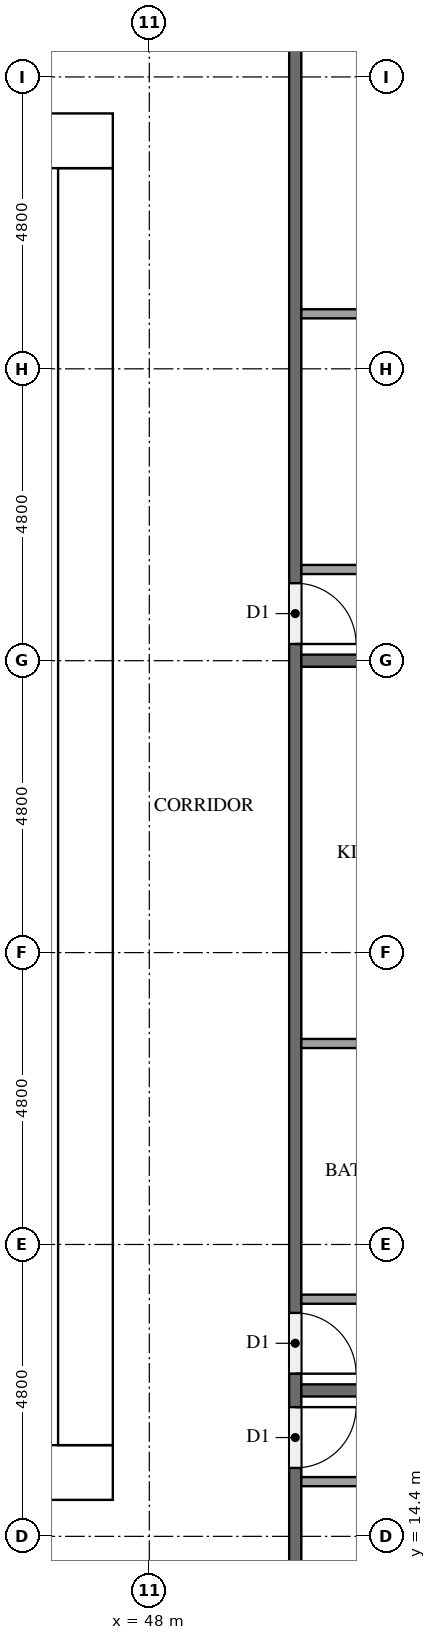
"""IFC4 building model, lengths in metres.
Left out: names, types, materials, properties, quantities, classifications, styles, units other than length and angle.
Written with IfcOpenShell. Run it as: python <this file> out.ifc"""

import sys

from ifc_helpers import new_model, si_unit, direction, frame, frame_2d, origin, place, context, subcontext, project, spatial, rectangle, extrude, element, fill, save


model = new_model("IFC4")
c1 = context("Model", 3, precision=1e-05, world=origin(), true_north=direction((0.0, 1.0)))
c2 = subcontext(c1, "Body", "Model", "MODEL_VIEW")
j1 = project(units=[si_unit("LENGTHUNIT", "METRE"), si_unit("PLANEANGLEUNIT", "RADIAN")], contexts=[c1])
p1 = place(None, origin())
s1 = spatial("IfcSite", under=j1, at=p1, CompositionType="ELEMENT")
p2 = place(p1, origin())
s2 = spatial("IfcBuilding", under=s1, at=p2, CompositionType="ELEMENT")
p3 = place(p2, frame((0.0, 0.0, 66.3)))
s3 = spatial("IfcBuildingStorey", under=s2, at=p3, CompositionType="ELEMENT", Elevation=66.3)
p4 = place(p3, frame((15.0, 15.45, 0.0), z_axis=(0.0, 0.0, 1.0), x_axis=(1.0, 0.0, 0.0)))
e1 = element("IfcWall", 1, at=p4, inside=s3, PredefinedType="SHEAR", context=c2, shape_type="SweptSolid", body=[
    extrude(rectangle(XDim=32.4, YDim=0.9, at=frame_2d((16.2, 0.0))), origin(), (0.0, 0.0, 1.0), 3.2),
])
p5 = place(p4, frame((15.3, 0.0, 0.0)))
e2 = element("IfcOpeningElement", 2, at=p5, cuts=e1, PredefinedType="OPENING", context=c2, shape_type="SweptSolid", body=[
    extrude(rectangle(XDim=1.8, YDim=2.1, at=frame_2d((0.9, 1.05))), frame((0.0, 0.46, 0.0), z_axis=(0.0, -1.0, 0.0), x_axis=(1.0, 0.0, 0.0)), (0.0, 0.0, 1.0), 0.92),
])
p6 = place(p3, frame((15.0, 37.35, 0.0), z_axis=(0.0, 0.0, 1.0), x_axis=(1.0, 0.0, 0.0)))
e3 = element("IfcWall", 3, at=p6, inside=s3, PredefinedType="SHEAR", context=c2, shape_type="SweptSolid", body=[
    extrude(rectangle(XDim=32.4, YDim=0.9, at=frame_2d((16.2, 0.0))), origin(), (0.0, 0.0, 1.0), 3.2),
])
p7 = place(p6, frame((15.3, 0.0, 0.0)))
e4 = element("IfcOpeningElement", 4, at=p7, cuts=e3, PredefinedType="OPENING", context=c2, shape_type="SweptSolid", body=[
    extrude(rectangle(XDim=1.8, YDim=2.1, at=frame_2d((0.9, 1.05))), frame((0.0, 0.46, 0.0), z_axis=(0.0, -1.0, 0.0), x_axis=(1.0, 0.0, 0.0)), (0.0, 0.0, 1.0), 0.92),
])
p8 = place(p6, frame((1.794, 0.0, 0.0)))
e5 = element("IfcOpeningElement", 5, at=p8, cuts=e3, PredefinedType="OPENING", context=c2, shape_type="SweptSolid", body=[
    extrude(rectangle(XDim=1.0, YDim=2.1, at=frame_2d((0.5, 1.05))), frame((0.0, 0.46, 0.0), z_axis=(0.0, -1.0, 0.0), x_axis=(1.0, 0.0, 0.0)), (0.0, 0.0, 1.0), 0.92),
])
p9 = place(p6, frame((5.331, 0.0, 0.0)))
e6 = element("IfcOpeningElement", 6, at=p9, cuts=e3, PredefinedType="OPENING", context=c2, shape_type="SweptSolid", body=[
    extrude(rectangle(XDim=1.0, YDim=2.1, at=frame_2d((0.5, 1.05))), frame((0.0, 0.46, 0.0), z_axis=(0.0, -1.0, 0.0), x_axis=(1.0, 0.0, 0.0)), (0.0, 0.0, 1.0), 0.92),
])
p10 = place(p3, frame((46.95, 15.9, 0.0), z_axis=(0.0, 0.0, 1.0), x_axis=(0.0, 1.0, 0.0)))
e7 = element("IfcWall", 7, at=p10, inside=s3, PredefinedType="SHEAR", context=c2, shape_type="SweptSolid", body=[
    extrude(rectangle(XDim=21.0, YDim=0.9, at=frame_2d((10.5, 0.0))), origin(), (0.0, 0.0, 1.0), 3.2),
])
p11 = place(p10, frame((10.2, 0.0, 0.0)))
e8 = element("IfcOpeningElement", 8, at=p11, cuts=e7, PredefinedType="OPENING", context=c2, shape_type="SweptSolid", body=[
    extrude(rectangle(XDim=1.2, YDim=2.1, at=frame_2d((0.6, 1.05))), frame((0.0, 0.46, 0.0), z_axis=(0.0, -1.0, 0.0), x_axis=(1.0, 0.0, 0.0)), (0.0, 0.0, 1.0), 0.92),
])
p12 = place(p3, frame((50.4, 40.7, 0.0), z_axis=(0.0, 0.0, 1.0), x_axis=(0.0, -1.0, 0.0)))
e9 = element("IfcWall", 9, at=p12, inside=s3, PredefinedType="PARTITIONING", context=c2, shape_type="SweptSolid", body=[
    extrude(rectangle(XDim=28.6, YDim=0.2, at=frame_2d((14.3, 0.0))), origin(), (0.0, 0.0, 1.0), 3.2),
])
p13 = place(p12, frame((24.175, 0.0, 0.0)))
e10 = element("IfcOpeningElement", 10, at=p13, cuts=e9, PredefinedType="OPENING", context=c2, shape_type="SweptSolid", body=[
    extrude(rectangle(XDim=1.0, YDim=2.1, at=frame_2d((0.5, 1.05))), frame((0.0, 0.11, 0.0), z_axis=(0.0, -1.0, 0.0), x_axis=(1.0, 0.0, 0.0)), (0.0, 0.0, 1.0), 0.22),
])
p14 = place(p12, frame((22.625, 0.0, 0.0)))
e11 = element("IfcOpeningElement", 11, at=p14, cuts=e9, PredefinedType="OPENING", context=c2, shape_type="SweptSolid", body=[
    extrude(rectangle(XDim=1.0, YDim=2.1, at=frame_2d((0.5, 1.05))), frame((0.0, 0.11, 0.0), z_axis=(0.0, -1.0, 0.0), x_axis=(1.0, 0.0, 0.0)), (0.0, 0.0, 1.0), 0.22),
])
p15 = place(p12, frame((10.625, 0.0, 0.0)))
e12 = element("IfcOpeningElement", 12, at=p15, cuts=e9, PredefinedType="OPENING", context=c2, shape_type="SweptSolid", body=[
    extrude(rectangle(XDim=1.0, YDim=2.1, at=frame_2d((0.5, 1.05))), frame((0.0, 0.11, 0.0), z_axis=(0.0, -1.0, 0.0), x_axis=(1.0, 0.0, 0.0)), (0.0, 0.0, 1.0), 0.22),
])
for number, where, z_axis, x_axis in (
    (13, (50.5, 16.8, 0.0), (0.0, 0.0, 1.0), (1.0, 0.0, 0.0)),
    (14, (50.5, 28.8, 0.0), (0.0, 0.0, 1.0), (1.0, 0.0, 0.0)),
):
    element("IfcWall", number, at=place(p3, frame(where, z_axis=z_axis, x_axis=x_axis)), inside=s3, PredefinedType="PARTITIONING", context=c2, shape_type="SweptSolid", body=[
        extrude(rectangle(XDim=11.8, YDim=0.2, at=frame_2d((5.9, 0.0))), origin(), (0.0, 0.0, 1.0), 3.2),
    ])
p16 = place(p3, frame((50.5, 15.3, 0.0), z_axis=(0.0, 0.0, 1.0), x_axis=(1.0, 0.0, 0.0)))
e15 = element("IfcWall", 15, at=p16, inside=s3, PredefinedType="PARTITIONING", context=c2, shape_type="SweptSolid", body=[
    extrude(rectangle(XDim=3.725, YDim=0.15, at=frame_2d((1.863, 0.0))), origin(), (0.0, 0.0, 1.0), 3.2),
])
p17 = place(p3, frame((50.5, 22.505, 0.0), z_axis=(0.0, 0.0, 1.0), x_axis=(1.0, 0.0, 0.0)))
e16 = element("IfcWall", 16, at=p17, inside=s3, PredefinedType="PARTITIONING", context=c2, shape_type="SweptSolid", body=[
    extrude(rectangle(XDim=3.275, YDim=0.15, at=frame_2d((1.637, 0.0))), origin(), (0.0, 0.0, 1.0), 3.2),
])
p18 = place(p3, frame((50.5, 18.3, 0.0), z_axis=(0.0, 0.0, 1.0), x_axis=(1.0, 0.0, 0.0)))
e17 = element("IfcWall", 17, at=p18, inside=s3, PredefinedType="PARTITIONING", context=c2, shape_type="SweptSolid", body=[
    extrude(rectangle(XDim=3.425, YDim=0.15, at=frame_2d((1.712, 0.0))), origin(), (0.0, 0.0, 1.0), 3.2),
])
p19 = place(p3, frame((50.5, 34.505, 0.0), z_axis=(0.0, 0.0, 1.0), x_axis=(1.0, 0.0, 0.0)))
e18 = element("IfcWall", 18, at=p19, inside=s3, PredefinedType="PARTITIONING", context=c2, shape_type="SweptSolid", body=[
    extrude(rectangle(XDim=4.475, YDim=0.15, at=frame_2d((2.238, 0.0))), origin(), (0.0, 0.0, 1.0), 3.2),
])
p20 = place(p3, frame((50.5, 30.3, 0.0), z_axis=(0.0, 0.0, 1.0), x_axis=(1.0, 0.0, 0.0)))
e19 = element("IfcWall", 19, at=p20, inside=s3, PredefinedType="PARTITIONING", context=c2, shape_type="SweptSolid", body=[
    extrude(rectangle(XDim=4.625, YDim=0.15, at=frame_2d((2.312, 0.0))), origin(), (0.0, 0.0, 1.0), 3.2),
])
p21 = place(p11, origin())
e20 = element("IfcDoor", 20, at=p21, inside=s3, OperationType="SINGLE_SWING_RIGHT", PredefinedType="DOOR", context=c2, shape_type="SweptSolid", body=[
    extrude(rectangle(XDim=1.2, YDim=2.1, at=frame_2d((0.6, 1.05))), frame((0.0, 0.025, 0.0), z_axis=(0.0, -1.0, 0.0), x_axis=(1.0, 0.0, 0.0)), (0.0, 0.0, 1.0), 0.05),
])
fill(e8, e20)
p22 = place(p13, origin())
e21 = element("IfcDoor", 21, at=p22, inside=s3, OperationType="SINGLE_SWING_LEFT", PredefinedType="DOOR", context=c2, shape_type="SweptSolid", body=[
    extrude(rectangle(XDim=1.0, YDim=2.1, at=frame_2d((0.5, 1.05))), frame((0.0, 0.025, 0.0), z_axis=(0.0, -1.0, 0.0), x_axis=(1.0, 0.0, 0.0)), (0.0, 0.0, 1.0), 0.05),
])
fill(e10, e21)
p23 = place(p14, origin())
e22 = element("IfcDoor", 22, at=p23, inside=s3, OperationType="SINGLE_SWING_RIGHT", PredefinedType="DOOR", context=c2, shape_type="SweptSolid", body=[
    extrude(rectangle(XDim=1.0, YDim=2.1, at=frame_2d((0.5, 1.05))), frame((0.0, 0.025, 0.0), z_axis=(0.0, -1.0, 0.0), x_axis=(1.0, 0.0, 0.0)), (0.0, 0.0, 1.0), 0.05),
])
fill(e11, e22)
p24 = place(p15, origin())
e23 = element("IfcDoor", 23, at=p24, inside=s3, OperationType="SINGLE_SWING_RIGHT", PredefinedType="DOOR", context=c2, shape_type="SweptSolid", body=[
    extrude(rectangle(XDim=1.0, YDim=2.1, at=frame_2d((0.5, 1.05))), frame((0.0, 0.025, 0.0), z_axis=(0.0, -1.0, 0.0), x_axis=(1.0, 0.0, 0.0)), (0.0, 0.0, 1.0), 0.05),
])
fill(e12, e23)
save(model, sys.argv[1])
